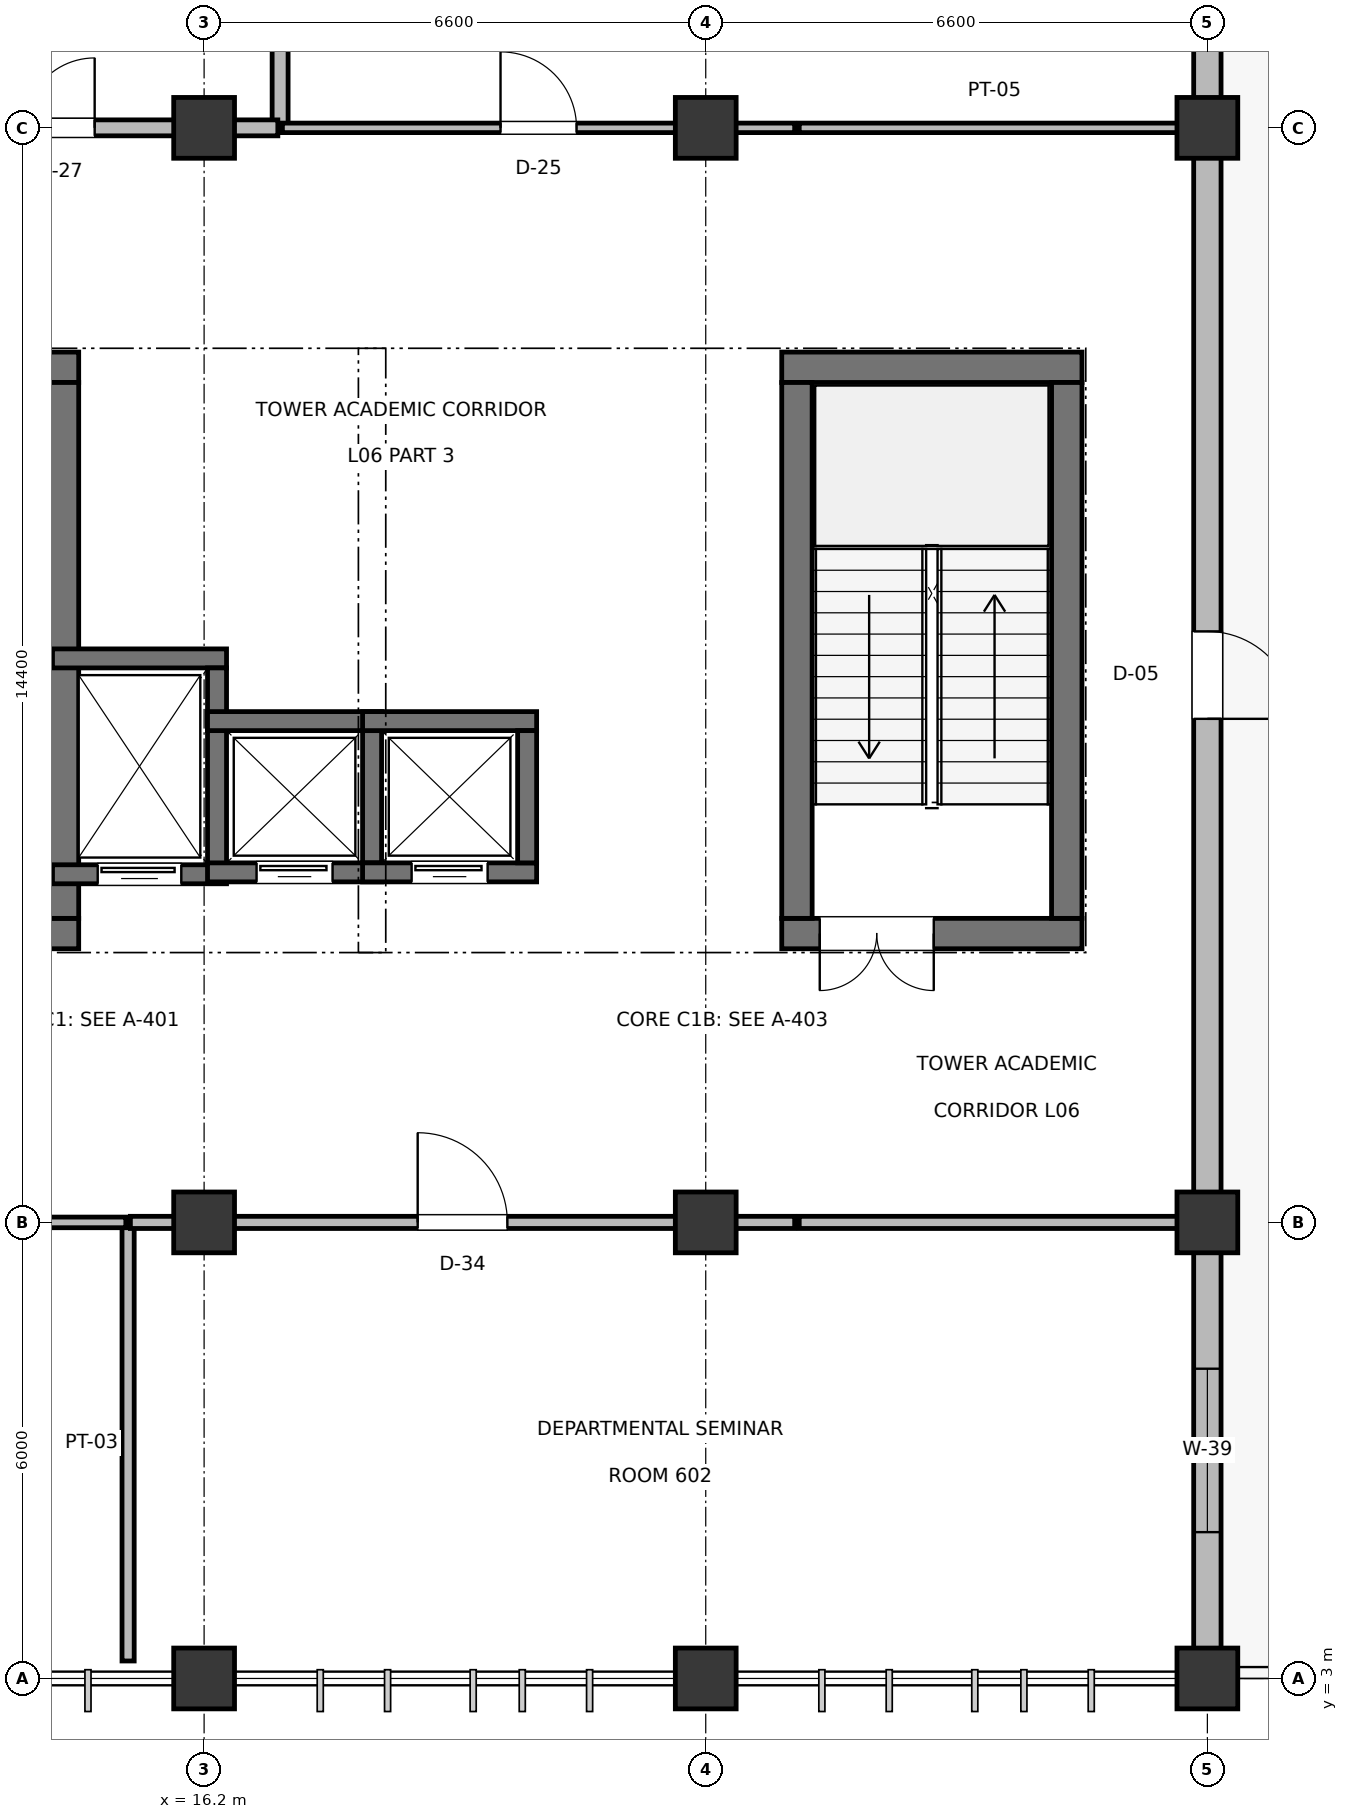
"""IFC4 building model, lengths in metres.
Left out: names, types, materials, properties, quantities, classifications, styles, units other than length and angle.
Written with IfcOpenShell. Run it as: python <this file> out.ifc"""

import sys

from ifc_helpers import new_model, si_unit, direction, frame, frame_2d, origin, origin_2d, place, context, subcontext, project, spatial, rectangle, extrude, element, fill, save


model = new_model("IFC4")
c1 = context("Model", 3, precision=1e-05, world=origin(), true_north=direction((0.0, 1.0)))
c2 = subcontext(c1, "Body", "Model", "MODEL_VIEW")
j1 = project(units=[si_unit("LENGTHUNIT", "METRE"), si_unit("PLANEANGLEUNIT", "RADIAN")], contexts=[c1])
p1 = place(None, origin())
s1 = spatial("IfcSite", under=j1, at=p1, CompositionType="ELEMENT")
p2 = place(p1, origin())
s2 = spatial("IfcBuilding", under=s1, at=p2, CompositionType="ELEMENT")
p3 = place(p2, frame((0.0, 0.0, 28.5)))
s3 = spatial("IfcBuildingStorey", under=s2, at=p3, CompositionType="ELEMENT", Elevation=28.5)
for number, where, z_axis, x_axis in (
    (1, (16.2, 3.0, 0.0), (0.0, 0.0, 1.0), (1.0, 0.0, 0.0)),
    (2, (16.2, 9.0, 0.0), (0.0, 0.0, 1.0), (1.0, 0.0, 0.0)),
    (3, (16.2, 23.4, 0.0), (0.0, 0.0, 1.0), (1.0, 0.0, 0.0)),
    (4, (22.8, 3.0, 0.0), (0.0, 0.0, 1.0), (1.0, 0.0, 0.0)),
    (5, (22.8, 9.0, 0.0), (0.0, 0.0, 1.0), (1.0, 0.0, 0.0)),
    (6, (22.8, 23.4, 0.0), (0.0, 0.0, 1.0), (1.0, 0.0, 0.0)),
    (7, (29.4, 3.0, 0.0), (0.0, 0.0, 1.0), (1.0, 0.0, 0.0)),
    (8, (29.4, 9.0, 0.0), (0.0, 0.0, 1.0), (1.0, 0.0, 0.0)),
    (9, (29.4, 23.4, 0.0), (0.0, 0.0, 1.0), (1.0, 0.0, 0.0)),
):
    element("IfcColumn", number, at=place(p3, frame(where, z_axis=z_axis, x_axis=x_axis)), inside=s3, PredefinedType="COLUMN", context=c2, shape_type="SweptSolid", body=[
        extrude(rectangle(XDim=0.8, YDim=0.8, at=origin_2d()), origin(), (0.0, 0.0, 1.0), 4.5),
    ])
p4 = place(p3, frame((29.4, 3.385, 0.0), z_axis=(0.0, 0.0, 1.0), x_axis=(0.0, 1.0, 0.0)))
e10 = element("IfcWall", 10, at=p4, inside=s3, PredefinedType="SOLIDWALL", context=c2, shape_type="SweptSolid", body=[
    extrude(rectangle(XDim=5.23, YDim=0.36, at=frame_2d((2.615, 0.0))), origin(), (0.0, 0.0, 1.0), 3.625),
])
p5 = place(p4, frame((1.54, 0.0, 0.9)))
e11 = element("IfcOpeningElement", 11, at=p5, cuts=e10, PredefinedType="OPENING", context=c2, shape_type="SweptSolid", body=[
    extrude(rectangle(XDim=2.15, YDim=1.7, at=frame_2d((1.075, 0.85))), frame((0.0, 0.19, 0.0), z_axis=(0.0, -1.0, 0.0), x_axis=(1.0, 0.0, 0.0)), (0.0, 0.0, 1.0), 0.38),
])
p6 = place(p3, frame((29.4, 9.385, 0.0), z_axis=(0.0, 0.0, 1.0), x_axis=(0.0, 1.0, 0.0)))
e12 = element("IfcWall", 12, at=p6, inside=s3, PredefinedType="SOLIDWALL", context=c2, shape_type="SweptSolid", body=[
    extrude(rectangle(XDim=13.63, YDim=0.36, at=frame_2d((6.815, 0.0))), origin(), (0.0, 0.0, 1.0), 3.425),
])
p7 = place(p6, frame((6.24, 0.0, 0.0)))
e13 = element("IfcOpeningElement", 13, at=p7, cuts=e12, PredefinedType="OPENING", context=c2, shape_type="SweptSolid", body=[
    extrude(rectangle(XDim=1.15, YDim=2.2, at=frame_2d((0.575, 1.1))), frame((0.0, 0.19, 0.0), z_axis=(0.0, -1.0, 0.0), x_axis=(1.0, 0.0, 0.0)), (0.0, 0.0, 1.0), 0.38),
])
p8 = place(p3, frame((29.4, 23.785, 0.0), z_axis=(0.0, 0.0, 1.0), x_axis=(0.0, 1.0, 0.0)))
e14 = element("IfcWall", 14, at=p8, inside=s3, PredefinedType="SOLIDWALL", context=c2, shape_type="SweptSolid", body=[
    extrude(rectangle(XDim=5.83, YDim=0.36, at=frame_2d((2.915, 0.0))), origin(), (0.0, 0.0, 1.0), 3.625),
])
p9 = place(p8, frame((2.54, 0.0, 0.9)))
e15 = element("IfcOpeningElement", 15, at=p9, cuts=e14, PredefinedType="OPENING", context=c2, shape_type="SweptSolid", body=[
    extrude(rectangle(XDim=0.75, YDim=1.15, at=frame_2d((0.375, 0.575))), frame((0.0, 0.19, 0.0), z_axis=(0.0, -1.0, 0.0), x_axis=(1.0, 0.0, 0.0)), (0.0, 0.0, 1.0), 0.38),
])
p10 = place(p3, frame((10.6, 12.8, 0.0), z_axis=(0.0, 0.0, 1.0), x_axis=(1.0, 0.0, 0.0)))
e16 = element("IfcWall", 16, at=p10, inside=s3, PredefinedType="SHEAR", context=c2, shape_type="SweptSolid", body=[
    extrude(rectangle(XDim=3.95, YDim=0.4, at=frame_2d((1.975, 0.0))), origin(), (0.0, 0.0, 1.0), 4.28),
])
p11 = place(p10, frame((0.5, 0.0, 0.0)))
e17 = element("IfcOpeningElement", 17, at=p11, cuts=e16, PredefinedType="OPENING", context=c2, shape_type="SweptSolid", body=[
    extrude(rectangle(XDim=1.5, YDim=2.2, at=frame_2d((0.75, 1.1))), frame((0.0, 0.21, 0.0), z_axis=(0.0, -1.0, 0.0), x_axis=(1.0, 0.0, 0.0)), (0.0, 0.0, 1.0), 0.42),
])
p12 = place(p3, frame((10.6, 20.25, 0.0), z_axis=(0.0, 0.0, 1.0), x_axis=(1.0, 0.0, 0.0)))
e18 = element("IfcWall", 18, at=p12, inside=s3, PredefinedType="SHEAR", context=c2, shape_type="SweptSolid", body=[
    extrude(rectangle(XDim=3.95, YDim=0.4, at=frame_2d((1.975, 0.0))), origin(), (0.0, 0.0, 1.0), 4.28),
])
p13 = place(p3, frame((14.35, 13.0, 0.0), z_axis=(0.0, 0.0, 1.0), x_axis=(0.0, 1.0, 0.0)))
e19 = element("IfcWall", 19, at=p13, inside=s3, PredefinedType="SHEAR", context=c2, shape_type="SweptSolid", body=[
    extrude(rectangle(XDim=7.05, YDim=0.4, at=frame_2d((3.525, 0.0))), origin(), (0.0, 0.0, 1.0), 4.28),
])
p14 = place(p3, frame((14.205, 13.58, 0.0), z_axis=(0.0, 0.0, 1.0), x_axis=(1.0, 0.0, 0.0)))
e20 = element("IfcWall", 20, at=p14, inside=s3, PredefinedType="SHEAR", context=c2, shape_type="SweptSolid", body=[
    extrude(rectangle(XDim=2.29, YDim=0.25, at=frame_2d((1.145, 0.0))), origin(), (0.0, 0.0, 1.0), 4.26),
])
p15 = place(p14, frame((0.595, 0.0, 0.0)))
e21 = element("IfcOpeningElement", 21, at=p15, cuts=e20, PredefinedType="OPENING", context=c2, shape_type="SweptSolid", body=[
    extrude(rectangle(XDim=1.1, YDim=2.2, at=frame_2d((0.55, 1.1))), frame((0.0, 0.135, 0.0), z_axis=(0.0, -1.0, 0.0), x_axis=(1.0, 0.0, 0.0)), (0.0, 0.0, 1.0), 0.27),
])
p16 = place(p3, frame((14.205, 16.42, 0.0), z_axis=(0.0, 0.0, 1.0), x_axis=(1.0, 0.0, 0.0)))
e22 = element("IfcWall", 22, at=p16, inside=s3, PredefinedType="SHEAR", context=c2, shape_type="SweptSolid", body=[
    extrude(rectangle(XDim=2.29, YDim=0.25, at=frame_2d((1.145, 0.0))), origin(), (0.0, 0.0, 1.0), 4.26),
])
p17 = place(p3, frame((16.37, 13.705, 0.0), z_axis=(0.0, 0.0, 1.0), x_axis=(0.0, 1.0, 0.0)))
e23 = element("IfcWall", 23, at=p17, inside=s3, PredefinedType="SHEAR", context=c2, shape_type="SweptSolid", body=[
    extrude(rectangle(XDim=2.59, YDim=0.25, at=frame_2d((1.295, 0.0))), origin(), (0.0, 0.0, 1.0), 4.26),
])
p18 = place(p3, frame((16.245, 13.605, 0.0), z_axis=(0.0, 0.0, 1.0), x_axis=(1.0, 0.0, 0.0)))
e24 = element("IfcWall", 24, at=p18, inside=s3, PredefinedType="SHEAR", context=c2, shape_type="SweptSolid", body=[
    extrude(rectangle(XDim=2.29, YDim=0.25, at=frame_2d((1.145, 0.0))), origin(), (0.0, 0.0, 1.0), 4.26),
])
p19 = place(p18, frame((0.645, 0.0, 0.0)))
e25 = element("IfcOpeningElement", 25, at=p19, cuts=e24, PredefinedType="OPENING", context=c2, shape_type="SweptSolid", body=[
    extrude(rectangle(XDim=1.0, YDim=2.15, at=frame_2d((0.5, 1.075))), frame((0.0, 0.135, 0.0), z_axis=(0.0, -1.0, 0.0), x_axis=(1.0, 0.0, 0.0)), (0.0, 0.0, 1.0), 0.27),
])
p20 = place(p3, frame((16.245, 15.595, 0.0), z_axis=(0.0, 0.0, 1.0), x_axis=(1.0, 0.0, 0.0)))
e26 = element("IfcWall", 26, at=p20, inside=s3, PredefinedType="SHEAR", context=c2, shape_type="SweptSolid", body=[
    extrude(rectangle(XDim=2.29, YDim=0.25, at=frame_2d((1.145, 0.0))), origin(), (0.0, 0.0, 1.0), 4.26),
])
p21 = place(p3, frame((18.41, 13.73, 0.0), z_axis=(0.0, 0.0, 1.0), x_axis=(0.0, 1.0, 0.0)))
e27 = element("IfcWall", 27, at=p21, inside=s3, PredefinedType="SHEAR", context=c2, shape_type="SweptSolid", body=[
    extrude(rectangle(XDim=1.74, YDim=0.25, at=frame_2d((0.87, 0.0))), origin(), (0.0, 0.0, 1.0), 4.26),
])
p22 = place(p3, frame((23.8, 12.8, 0.0), z_axis=(0.0, 0.0, 1.0), x_axis=(1.0, 0.0, 0.0)))
e28 = element("IfcWall", 28, at=p22, inside=s3, PredefinedType="SHEAR", context=c2, shape_type="SweptSolid", body=[
    extrude(rectangle(XDim=3.95, YDim=0.4, at=frame_2d((1.975, 0.0))), origin(), (0.0, 0.0, 1.0), 4.28),
])
p23 = place(p22, frame((0.5, 0.0, 0.0)))
e29 = element("IfcOpeningElement", 29, at=p23, cuts=e28, PredefinedType="OPENING", context=c2, shape_type="SweptSolid", body=[
    extrude(rectangle(XDim=1.5, YDim=2.2, at=frame_2d((0.75, 1.1))), frame((0.0, 0.21, 0.0), z_axis=(0.0, -1.0, 0.0), x_axis=(1.0, 0.0, 0.0)), (0.0, 0.0, 1.0), 0.42),
])
p24 = place(p3, frame((23.8, 20.25, 0.0), z_axis=(0.0, 0.0, 1.0), x_axis=(1.0, 0.0, 0.0)))
e30 = element("IfcWall", 30, at=p24, inside=s3, PredefinedType="SHEAR", context=c2, shape_type="SweptSolid", body=[
    extrude(rectangle(XDim=3.95, YDim=0.4, at=frame_2d((1.975, 0.0))), origin(), (0.0, 0.0, 1.0), 4.28),
])
for number, where, z_axis, x_axis in (
    (31, (24.0, 13.0, 0.0), (0.0, 0.0, 1.0), (0.0, 1.0, 0.0)),
    (32, (27.55, 13.0, 0.0), (0.0, 0.0, 1.0), (0.0, 1.0, 0.0)),
):
    element("IfcWall", number, at=place(p3, frame(where, z_axis=z_axis, x_axis=x_axis)), inside=s3, PredefinedType="SHEAR", context=c2, shape_type="SweptSolid", body=[
        extrude(rectangle(XDim=7.05, YDim=0.4, at=frame_2d((3.525, 0.0))), origin(), (0.0, 0.0, 1.0), 4.28),
    ])
p25 = place(p3, frame((18.285, 13.605, 0.0), z_axis=(0.0, 0.0, 1.0), x_axis=(1.0, 0.0, 0.0)))
e33 = element("IfcWall", 33, at=p25, inside=s3, PredefinedType="SHEAR", context=c2, shape_type="SweptSolid", body=[
    extrude(rectangle(XDim=2.29, YDim=0.25, at=frame_2d((1.145, 0.0))), origin(), (0.0, 0.0, 1.0), 4.26),
])
p26 = place(p25, frame((0.645, 0.0, 0.0)))
e34 = element("IfcOpeningElement", 34, at=p26, cuts=e33, PredefinedType="OPENING", context=c2, shape_type="SweptSolid", body=[
    extrude(rectangle(XDim=1.0, YDim=2.15, at=frame_2d((0.5, 1.075))), frame((0.0, 0.135, 0.0), z_axis=(0.0, -1.0, 0.0), x_axis=(1.0, 0.0, 0.0)), (0.0, 0.0, 1.0), 0.27),
])
p27 = place(p3, frame((18.285, 15.595, 0.0), z_axis=(0.0, 0.0, 1.0), x_axis=(1.0, 0.0, 0.0)))
e35 = element("IfcWall", 35, at=p27, inside=s3, PredefinedType="SHEAR", context=c2, shape_type="SweptSolid", body=[
    extrude(rectangle(XDim=2.29, YDim=0.25, at=frame_2d((1.145, 0.0))), origin(), (0.0, 0.0, 1.0), 4.26),
])
p28 = place(p3, frame((20.45, 13.73, 0.0), z_axis=(0.0, 0.0, 1.0), x_axis=(0.0, 1.0, 0.0)))
e36 = element("IfcWall", 36, at=p28, inside=s3, PredefinedType="SHEAR", context=c2, shape_type="SweptSolid", body=[
    extrude(rectangle(XDim=1.74, YDim=0.25, at=frame_2d((0.87, 0.0))), origin(), (0.0, 0.0, 1.0), 4.26),
])
p29 = place(p3, frame((15.2, 3.23, 0.0), z_axis=(0.0, 0.0, 1.0), x_axis=(0.0, 1.0, 0.0)))
e37 = element("IfcWall", 37, at=p29, inside=s3, PredefinedType="PARTITIONING", context=c2, shape_type="SweptSolid", body=[
    extrude(rectangle(XDim=5.74, YDim=0.16, at=frame_2d((2.87, 0.0))), origin(), (0.0, 0.0, 1.0), 3.525),
])
p30 = place(p3, frame((10.83, 9.0, 0.0), z_axis=(0.0, 0.0, 1.0), x_axis=(1.0, 0.0, 0.0)))
e38 = element("IfcWall", 38, at=p30, inside=s3, PredefinedType="PARTITIONING", context=c2, shape_type="SweptSolid", body=[
    extrude(rectangle(XDim=4.34, YDim=0.14, at=frame_2d((2.17, 0.0))), origin(), (0.0, 0.0, 1.0), 3.525),
])
p31 = place(p3, frame((24.03, 9.0, 0.0), z_axis=(0.0, 0.0, 1.0), x_axis=(1.0, 0.0, 0.0)))
e39 = element("IfcWall", 39, at=p31, inside=s3, PredefinedType="PARTITIONING", context=c2, shape_type="SweptSolid", body=[
    extrude(rectangle(XDim=5.14, YDim=0.16, at=frame_2d((2.57, 0.0))), origin(), (0.0, 0.0, 1.0), 3.525),
])
p32 = place(p3, frame((15.23, 9.0, 0.0), z_axis=(0.0, 0.0, 1.0), x_axis=(1.0, 0.0, 0.0)))
e40 = element("IfcWall", 40, at=p32, inside=s3, PredefinedType="PARTITIONING", context=c2, shape_type="SweptSolid", body=[
    extrude(rectangle(XDim=8.74, YDim=0.16, at=frame_2d((4.37, 0.0))), origin(), (0.0, 0.0, 1.0), 3.355),
])
p33 = place(p32, frame((3.78, 0.0, 0.0)))
e41 = element("IfcOpeningElement", 41, at=p33, cuts=e40, PredefinedType="OPENING", context=c2, shape_type="SweptSolid", body=[
    extrude(rectangle(XDim=1.18, YDim=2.2, at=frame_2d((0.59, 1.1))), frame((0.0, 0.09, 0.0), z_axis=(0.0, -1.0, 0.0), x_axis=(1.0, 0.0, 0.0)), (0.0, 0.0, 1.0), 0.18),
])
p34 = place(p3, frame((17.2, 23.43, 0.0), z_axis=(0.0, 0.0, 1.0), x_axis=(0.0, 1.0, 0.0)))
e42 = element("IfcWall", 42, at=p34, inside=s3, PredefinedType="PLUMBINGWALL", context=c2, shape_type="SweptSolid", body=[
    extrude(rectangle(XDim=6.34, YDim=0.21, at=frame_2d((3.17, 0.0))), origin(), (0.0, 0.0, 1.0), 3.255),
])
p35 = place(p3, frame((11.43, 23.4, 0.0), z_axis=(0.0, 0.0, 1.0), x_axis=(1.0, 0.0, 0.0)))
e43 = element("IfcWall", 43, at=p35, inside=s3, PredefinedType="PLUMBINGWALL", context=c2, shape_type="SweptSolid", body=[
    extrude(rectangle(XDim=5.74, YDim=0.21, at=frame_2d((2.87, 0.0))), origin(), (0.0, 0.0, 1.0), 3.295),
])
p36 = place(p35, frame((2.41, 0.0, 0.0)))
e44 = element("IfcOpeningElement", 44, at=p36, cuts=e43, PredefinedType="OPENING", context=c2, shape_type="SweptSolid", body=[
    extrude(rectangle(XDim=0.92, YDim=2.1, at=frame_2d((0.46, 1.05))), frame((0.0, 0.115, 0.0), z_axis=(0.0, -1.0, 0.0), x_axis=(1.0, 0.0, 0.0)), (0.0, 0.0, 1.0), 0.23),
])
p37 = place(p3, frame((24.03, 23.4, 0.0), z_axis=(0.0, 0.0, 1.0), x_axis=(1.0, 0.0, 0.0)))
e45 = element("IfcWall", 45, at=p37, inside=s3, PredefinedType="PARTITIONING", context=c2, shape_type="SweptSolid", body=[
    extrude(rectangle(XDim=5.14, YDim=0.125, at=frame_2d((2.57, 0.0))), origin(), (0.0, 0.0, 1.0), 3.525),
])
p38 = place(p3, frame((17.23, 23.4, 0.0), z_axis=(0.0, 0.0, 1.0), x_axis=(1.0, 0.0, 0.0)))
e46 = element("IfcWall", 46, at=p38, inside=s3, PredefinedType="PARTITIONING", context=c2, shape_type="SweptSolid", body=[
    extrude(rectangle(XDim=6.74, YDim=0.125, at=frame_2d((3.37, 0.0))), origin(), (0.0, 0.0, 1.0), 3.295),
])
p39 = place(p38, frame((2.87, 0.0, 0.0)))
e47 = element("IfcOpeningElement", 47, at=p39, cuts=e46, PredefinedType="OPENING", context=c2, shape_type="SweptSolid", body=[
    extrude(rectangle(XDim=1.0, YDim=2.15, at=frame_2d((0.5, 1.075))), frame((0.0, 0.073, 0.0), z_axis=(0.0, -1.0, 0.0), x_axis=(1.0, 0.0, 0.0)), (0.0, 0.0, 1.0), 0.145),
])
p40 = place(p5, frame((2.15, 0.0, 0.0), z_axis=(0.0, 0.0, 1.0), x_axis=(-1.0, 0.0, 0.0)))
e48 = element("IfcWindow", 48, at=p40, inside=s3, PartitioningType="DOUBLE_PANEL_VERTICAL", PredefinedType="WINDOW", context=c2, shape_type="SweptSolid", body=[
    extrude(rectangle(XDim=2.15, YDim=1.7, at=frame_2d((1.075, 0.85))), frame((0.0, 0.03, 0.0), z_axis=(0.0, -1.0, 0.0), x_axis=(1.0, 0.0, 0.0)), (0.0, 0.0, 1.0), 0.06),
])
fill(e11, e48)
p41 = place(p7, frame((1.15, 0.0, 0.0), z_axis=(0.0, 0.0, 1.0), x_axis=(-1.0, 0.0, 0.0)))
e49 = element("IfcDoor", 49, at=p41, inside=s3, OperationType="SINGLE_SWING_LEFT", PredefinedType="DOOR", context=c2, shape_type="SweptSolid", body=[
    extrude(rectangle(XDim=1.15, YDim=2.2, at=frame_2d((0.575, 1.1))), frame((0.0, 0.025, 0.0), z_axis=(0.0, -1.0, 0.0), x_axis=(1.0, 0.0, 0.0)), (0.0, 0.0, 1.0), 0.05),
])
fill(e13, e49)
p42 = place(p15, frame((1.1, 0.0, 0.0), z_axis=(0.0, 0.0, 1.0), x_axis=(-1.0, 0.0, 0.0)))
e50 = element("IfcDoor", 50, at=p42, inside=s3, OperationType="SLIDING_TO_LEFT", PredefinedType="DOOR", context=c2, shape_type="SweptSolid", body=[
    extrude(rectangle(XDim=1.1, YDim=2.2, at=frame_2d((0.55, 1.1))), frame((0.0, 0.025, 0.0), z_axis=(0.0, -1.0, 0.0), x_axis=(1.0, 0.0, 0.0)), (0.0, 0.0, 1.0), 0.05),
])
fill(e21, e50)
p43 = place(p19, frame((1.0, 0.0, 0.0), z_axis=(0.0, 0.0, 1.0), x_axis=(-1.0, 0.0, 0.0)))
e51 = element("IfcDoor", 51, at=p43, inside=s3, OperationType="SLIDING_TO_LEFT", PredefinedType="DOOR", context=c2, shape_type="SweptSolid", body=[
    extrude(rectangle(XDim=1.0, YDim=2.15, at=frame_2d((0.5, 1.075))), frame((0.0, 0.025, 0.0), z_axis=(0.0, -1.0, 0.0), x_axis=(1.0, 0.0, 0.0)), (0.0, 0.0, 1.0), 0.05),
])
fill(e25, e51)
p44 = place(p23, frame((1.5, 0.0, 0.0), z_axis=(0.0, 0.0, 1.0), x_axis=(-1.0, 0.0, 0.0)))
e52 = element("IfcDoor", 52, at=p44, inside=s3, OperationType="DOUBLE_DOOR_SINGLE_SWING", PredefinedType="DOOR", context=c2, shape_type="SweptSolid", body=[
    extrude(rectangle(XDim=1.5, YDim=2.2, at=frame_2d((0.75, 1.1))), frame((0.0, 0.025, 0.0), z_axis=(0.0, -1.0, 0.0), x_axis=(1.0, 0.0, 0.0)), (0.0, 0.0, 1.0), 0.05),
])
fill(e29, e52)
p45 = place(p26, frame((1.0, 0.0, 0.0), z_axis=(0.0, 0.0, 1.0), x_axis=(-1.0, 0.0, 0.0)))
e53 = element("IfcDoor", 53, at=p45, inside=s3, OperationType="SLIDING_TO_LEFT", PredefinedType="DOOR", context=c2, shape_type="SweptSolid", body=[
    extrude(rectangle(XDim=1.0, YDim=2.15, at=frame_2d((0.5, 1.075))), frame((0.0, 0.025, 0.0), z_axis=(0.0, -1.0, 0.0), x_axis=(1.0, 0.0, 0.0)), (0.0, 0.0, 1.0), 0.05),
])
fill(e34, e53)
p46 = place(p33, origin())
e54 = element("IfcDoor", 54, at=p46, inside=s3, OperationType="SINGLE_SWING_LEFT", PredefinedType="DOOR", context=c2, shape_type="SweptSolid", body=[
    extrude(rectangle(XDim=1.18, YDim=2.2, at=frame_2d((0.59, 1.1))), frame((0.0, 0.025, 0.0), z_axis=(0.0, -1.0, 0.0), x_axis=(1.0, 0.0, 0.0)), (0.0, 0.0, 1.0), 0.05),
])
fill(e41, e54)
p47 = place(p36, origin())
e55 = element("IfcDoor", 55, at=p47, inside=s3, OperationType="SINGLE_SWING_RIGHT", PredefinedType="DOOR", context=c2, shape_type="SweptSolid", body=[
    extrude(rectangle(XDim=0.92, YDim=2.1, at=frame_2d((0.46, 1.05))), frame((0.0, 0.025, 0.0), z_axis=(0.0, -1.0, 0.0), x_axis=(1.0, 0.0, 0.0)), (0.0, 0.0, 1.0), 0.05),
])
fill(e44, e55)
p48 = place(p39, origin())
e56 = element("IfcDoor", 56, at=p48, inside=s3, OperationType="SINGLE_SWING_LEFT", PredefinedType="DOOR", context=c2, shape_type="SweptSolid", body=[
    extrude(rectangle(XDim=1.0, YDim=2.15, at=frame_2d((0.5, 1.075))), frame((0.0, 0.025, 0.0), z_axis=(0.0, -1.0, 0.0), x_axis=(1.0, 0.0, 0.0)), (0.0, 0.0, 1.0), 0.05),
])
fill(e47, e56)
save(model, sys.argv[1])
